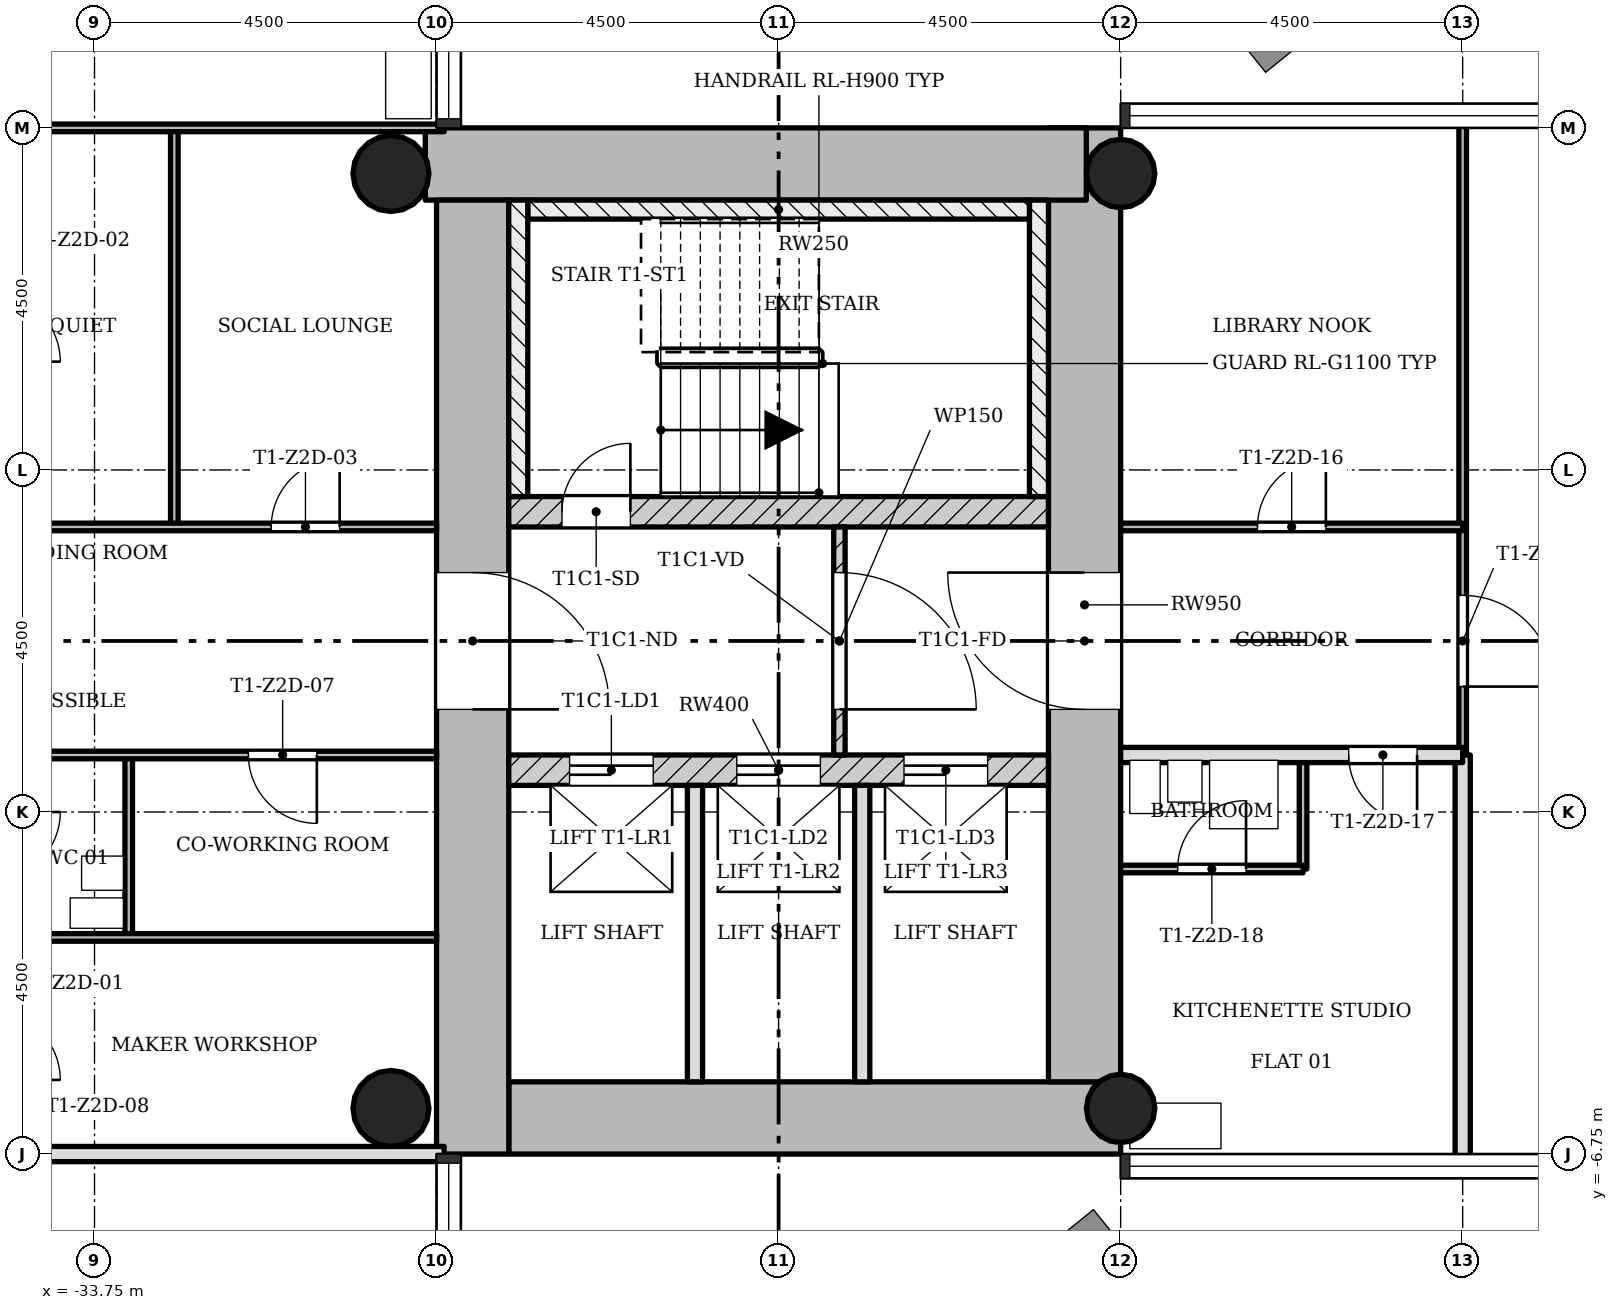
"""IFC4 building model, lengths in metres.
Left out: names, types, materials, properties, quantities, classifications, styles, units other than length and angle.
Written with IfcOpenShell. Run it as: python <this file> out.ifc"""

import sys

from ifc_helpers import new_model, si_unit, direction, frame, frame_2d, origin, origin_2d, place, context, subcontext, project, spatial, rectangle, hollow_circle, extrude, element, fill, save


model = new_model("IFC4")
c1 = context("Model", 3, precision=1e-05, world=origin(), true_north=direction((0.0, 1.0)))
c2 = subcontext(c1, "Body", "Model", "MODEL_VIEW")
j1 = project(units=[si_unit("LENGTHUNIT", "METRE"), si_unit("PLANEANGLEUNIT", "RADIAN")], contexts=[c1])
p1 = place(None, origin())
s1 = spatial("IfcSite", under=j1, at=p1, CompositionType="ELEMENT")
p2 = place(p1, origin())
s2 = spatial("IfcBuilding", under=s1, at=p2, CompositionType="ELEMENT")
p3 = place(p2, frame((0.0, 0.0, 120.8)))
s3 = spatial("IfcBuildingStorey", under=s2, at=p3, CompositionType="ELEMENT", Elevation=120.8)
p4 = place(p3, frame((-28.3, -6.275, 0.0), z_axis=(0.0, 0.0, 1.0), x_axis=(1.0, 0.0, 0.0)))
e1 = element("IfcWall", 1, at=p4, inside=s3, PredefinedType="SHEAR", context=c2, shape_type="SweptSolid", body=[
    extrude(rectangle(XDim=8.05, YDim=0.95, at=frame_2d((4.025, 0.0))), origin(), (0.0, 0.0, 1.0), 3.4),
])
p5 = place(p3, frame((-20.725, -5.8, 0.0), z_axis=(0.0, 0.0, 1.0), x_axis=(0.0, 1.0, 0.0)))
e2 = element("IfcWall", 2, at=p5, inside=s3, PredefinedType="SHEAR", context=c2, shape_type="SweptSolid", body=[
    extrude(rectangle(XDim=12.55, YDim=0.95, at=frame_2d((6.275, 0.0))), origin(), (0.0, 0.0, 1.0), 3.4),
])
p6 = place(p5, frame((4.9, 0.0, 0.0)))
e3 = element("IfcOpeningElement", 3, at=p6, cuts=e2, PredefinedType="OPENING", context=c2, shape_type="SweptSolid", body=[
    extrude(rectangle(XDim=1.8, YDim=2.1, at=frame_2d((0.9, 1.05))), frame((0.0, 0.485, 0.0), z_axis=(0.0, -1.0, 0.0), x_axis=(1.0, 0.0, 0.0)), (0.0, 0.0, 1.0), 0.97),
])
p7 = place(p3, frame((-20.702, 6.275, 0.0), z_axis=(0.0, 0.0, 1.0), x_axis=(-1.0, 0.0, 0.0)))
e4 = element("IfcWall", 4, at=p7, inside=s3, PredefinedType="SHEAR", context=c2, shape_type="SweptSolid", body=[
    extrude(rectangle(XDim=8.696, YDim=0.95, at=frame_2d((4.348, 0.0))), origin(), (0.0, 0.0, 1.0), 3.4),
])
p8 = place(p3, frame((-28.775, 5.8, 0.0), z_axis=(0.0, 0.0, 1.0), x_axis=(0.0, -1.0, 0.0)))
e5 = element("IfcWall", 5, at=p8, inside=s3, PredefinedType="SHEAR", context=c2, shape_type="SweptSolid", body=[
    extrude(rectangle(XDim=12.55, YDim=0.95, at=frame_2d((6.275, 0.0))), origin(), (0.0, 0.0, 1.0), 3.4),
])
p9 = place(p8, frame((4.9, 0.0, 0.0)))
e6 = element("IfcOpeningElement", 6, at=p9, cuts=e5, PredefinedType="OPENING", context=c2, shape_type="SweptSolid", body=[
    extrude(rectangle(XDim=1.8, YDim=2.1, at=frame_2d((0.9, 1.05))), frame((0.0, 0.485, 0.0), z_axis=(0.0, -1.0, 0.0), x_axis=(1.0, 0.0, 0.0)), (0.0, 0.0, 1.0), 0.97),
])
p10 = place(p3, frame((-28.3, -1.7, 0.0), z_axis=(0.0, 0.0, 1.0), x_axis=(1.0, 0.0, 0.0)))
e7 = element("IfcWall", 7, at=p10, inside=s3, PredefinedType="SHEAR", context=c2, shape_type="SweptSolid", body=[
    extrude(rectangle(XDim=7.1, YDim=0.4, at=frame_2d((3.55, 0.0))), origin(), (0.0, 0.0, 1.0), 3.4),
])
p11 = place(p10, frame((0.8, 0.0, 0.0)))
e8 = element("IfcOpeningElement", 8, at=p11, cuts=e7, PredefinedType="OPENING", context=c2, shape_type="SweptSolid", body=[
    extrude(rectangle(XDim=1.1, YDim=2.1, at=frame_2d((0.55, 1.05))), frame((0.0, 0.21, 0.0), z_axis=(0.0, -1.0, 0.0), x_axis=(1.0, 0.0, 0.0)), (0.0, 0.0, 1.0), 0.42),
])
p12 = place(p10, frame((3.0, 0.0, 0.0)))
e9 = element("IfcOpeningElement", 9, at=p12, cuts=e7, PredefinedType="OPENING", context=c2, shape_type="SweptSolid", body=[
    extrude(rectangle(XDim=1.1, YDim=2.1, at=frame_2d((0.55, 1.05))), frame((0.0, 0.21, 0.0), z_axis=(0.0, -1.0, 0.0), x_axis=(1.0, 0.0, 0.0)), (0.0, 0.0, 1.0), 0.42),
])
p13 = place(p10, frame((5.2, 0.0, 0.0)))
e10 = element("IfcOpeningElement", 10, at=p13, cuts=e7, PredefinedType="OPENING", context=c2, shape_type="SweptSolid", body=[
    extrude(rectangle(XDim=1.1, YDim=2.1, at=frame_2d((0.55, 1.05))), frame((0.0, 0.21, 0.0), z_axis=(0.0, -1.0, 0.0), x_axis=(1.0, 0.0, 0.0)), (0.0, 0.0, 1.0), 0.42),
])
p14 = place(p3, frame((-28.3, 1.7, 0.0), z_axis=(0.0, 0.0, 1.0), x_axis=(1.0, 0.0, 0.0)))
e11 = element("IfcWall", 11, at=p14, inside=s3, PredefinedType="SHEAR", context=c2, shape_type="SweptSolid", body=[
    extrude(rectangle(XDim=7.1, YDim=0.4, at=frame_2d((3.55, 0.0))), origin(), (0.0, 0.0, 1.0), 3.4),
])
p15 = place(p14, frame((0.7, 0.0, 0.0)))
e12 = element("IfcOpeningElement", 12, at=p15, cuts=e11, PredefinedType="OPENING", context=c2, shape_type="SweptSolid", body=[
    extrude(rectangle(XDim=0.9, YDim=2.1, at=frame_2d((0.45, 1.05))), frame((0.0, 0.21, 0.0), z_axis=(0.0, -1.0, 0.0), x_axis=(1.0, 0.0, 0.0)), (0.0, 0.0, 1.0), 0.42),
])
for number, where, z_axis, x_axis in (
    (13, (-20.25, -6.15, 0.0), (0.0, 0.0, 1.0), (1.0, 0.0, 0.0)),
    (14, (-20.25, 6.15, 0.0), (0.0, 0.0, 1.0), (1.0, 0.0, 0.0)),
):
    element("IfcColumn", number, at=place(p3, frame(where, z_axis=z_axis, x_axis=x_axis)), inside=s3, PredefinedType="COLUMN", context=c2, shape_type="SweptSolid", body=[
        extrude(hollow_circle(Radius=0.45, WallThickness=0.032, at=origin_2d()), origin(), (0.0, 0.0, 1.0), 3.4),
    ])
for number, where, z_axis, x_axis in (
    (15, (-29.85, -6.15, 0.0), (0.0, 0.0, 1.0), (1.0, 0.0, 0.0)),
    (16, (-29.85, 6.15, 0.0), (0.0, 0.0, 1.0), (1.0, 0.0, 0.0)),
):
    element("IfcColumn", number, at=place(p3, frame(where, z_axis=z_axis, x_axis=x_axis)), inside=s3, PredefinedType="COLUMN", context=c2, shape_type="SweptSolid", body=[
        extrude(hollow_circle(Radius=0.5, WallThickness=0.036, at=origin_2d()), origin(), (0.0, 0.0, 1.0), 3.4),
    ])
p16 = place(p3, frame((-23.95, -1.5, 0.0), z_axis=(0.0, 0.0, 1.0), x_axis=(0.0, 1.0, 0.0)))
e17 = element("IfcWall", 17, at=p16, inside=s3, PredefinedType="PARTITIONING", context=c2, shape_type="SweptSolid", body=[
    extrude(rectangle(XDim=3.0, YDim=0.15, at=frame_2d((1.5, 0.0))), origin(), (0.0, 0.0, 1.0), 3.0),
])
p17 = place(p16, frame((0.6, 0.0, 0.0)))
e18 = element("IfcOpeningElement", 18, at=p17, cuts=e17, PredefinedType="OPENING", context=c2, shape_type="SweptSolid", body=[
    extrude(rectangle(XDim=1.8, YDim=2.1, at=frame_2d((0.9, 1.05))), frame((0.0, 0.085, 0.0), z_axis=(0.0, -1.0, 0.0), x_axis=(1.0, 0.0, 0.0)), (0.0, 0.0, 1.0), 0.17),
])
for number, where, z_axis, x_axis in (
    (19, (-25.85, -5.8, 0.0), (0.0, 0.0, 1.0), (0.0, 1.0, 0.0)),
    (20, (-23.65, -5.8, 0.0), (0.0, 0.0, 1.0), (0.0, 1.0, 0.0)),
):
    element("IfcWall", number, at=place(p3, frame(where, z_axis=z_axis, x_axis=x_axis)), inside=s3, PredefinedType="SOLIDWALL", context=c2, shape_type="SweptSolid", body=[
        extrude(rectangle(XDim=3.9, YDim=0.2, at=frame_2d((1.95, 0.0))), origin(), (0.0, 0.0, 1.0), 3.0),
    ])
p18 = place(p3, frame((-33.3, -3.9, 0.0), z_axis=(0.0, 0.0, 1.0), x_axis=(0.0, 1.0, 0.0)))
e21 = element("IfcWall", 21, at=p18, inside=s3, PredefinedType="PARTITIONING", context=c2, shape_type="SweptSolid", body=[
    extrude(rectangle(XDim=2.4, YDim=0.1, at=frame_2d((1.2, 0.0))), origin(), (0.0, 0.0, 1.0), 3.0),
])
p19 = place(p3, frame((-32.7, 1.5, 0.0), z_axis=(0.0, 0.0, 1.0), x_axis=(0.0, 1.0, 0.0)))
e22 = element("IfcWall", 22, at=p19, inside=s3, PredefinedType="PARTITIONING", context=c2, shape_type="SweptSolid", body=[
    extrude(rectangle(XDim=5.25, YDim=0.1, at=frame_2d((2.625, 0.0))), origin(), (0.0, 0.0, 1.0), 3.0),
])
p20 = place(p3, frame((-17.85, -3.0, 0.0), z_axis=(0.0, 0.0, 1.0), x_axis=(0.0, 1.0, 0.0)))
e23 = element("IfcWall", 23, at=p20, inside=s3, PredefinedType="PARTITIONING", context=c2, shape_type="SweptSolid", body=[
    extrude(rectangle(XDim=1.5, YDim=0.1, at=frame_2d((0.75, 0.0))), origin(), (0.0, 0.0, 1.0), 3.0),
])
p21 = place(p3, frame((-15.75, -1.5, 0.0), z_axis=(0.0, 0.0, 1.0), x_axis=(0.0, 1.0, 0.0)))
e24 = element("IfcWall", 24, at=p21, inside=s3, PredefinedType="PARTITIONING", context=c2, shape_type="SweptSolid", body=[
    extrude(rectangle(XDim=8.35, YDim=0.1, at=frame_2d((4.175, 0.0))), origin(), (0.0, 0.0, 1.0), 3.0),
])
p22 = place(p21, frame((0.9, 0.0, 0.0)))
e25 = element("IfcOpeningElement", 25, at=p22, cuts=e24, PredefinedType="OPENING", context=c2, shape_type="SweptSolid", body=[
    extrude(rectangle(XDim=1.2, YDim=2.1, at=frame_2d((0.6, 1.05))), frame((0.0, 0.06, 0.0), z_axis=(0.0, -1.0, 0.0), x_axis=(1.0, 0.0, 0.0)), (0.0, 0.0, 1.0), 0.12),
])
p23 = place(p3, frame((-15.75, -6.85, 0.0), z_axis=(0.0, 0.0, 1.0), x_axis=(0.0, 1.0, 0.0)))
e26 = element("IfcWall", 26, at=p23, inside=s3, PredefinedType="SOLIDWALL", context=c2, shape_type="SweptSolid", body=[
    extrude(rectangle(XDim=5.35, YDim=0.2, at=frame_2d((2.675, 0.0))), origin(), (0.0, 0.0, 1.0), 3.0),
])
p24 = place(p3, frame((-35.1, -6.75, 0.0), z_axis=(0.0, 0.0, 1.0), x_axis=(1.0, 0.0, 0.0)))
e27 = element("IfcWall", 27, at=p24, inside=s3, PredefinedType="SOLIDWALL", context=c2, shape_type="SweptSolid", body=[
    extrude(rectangle(XDim=5.95, YDim=0.2, at=frame_2d((2.975, 0.0))), origin(), (0.0, 0.0, 1.0), 3.0),
])
p25 = place(p3, frame((-35.1, -3.9, 0.0), z_axis=(0.0, 0.0, 1.0), x_axis=(1.0, 0.0, 0.0)))
e28 = element("IfcWall", 28, at=p25, inside=s3, PredefinedType="PARTITIONING", context=c2, shape_type="SweptSolid", body=[
    extrude(rectangle(XDim=5.85, YDim=0.1, at=frame_2d((2.925, 0.0))), origin(), (0.0, 0.0, 1.0), 3.0),
])
p26 = place(p3, frame((-20.25, -3.0, 0.0), z_axis=(0.0, 0.0, 1.0), x_axis=(1.0, 0.0, 0.0)))
e29 = element("IfcWall", 29, at=p26, inside=s3, PredefinedType="PARTITIONING", context=c2, shape_type="SweptSolid", body=[
    extrude(rectangle(XDim=2.4, YDim=0.1, at=frame_2d((1.2, 0.0))), origin(), (0.0, 0.0, 1.0), 3.0),
])
p27 = place(p26, frame((0.75, 0.0, 0.0)))
e30 = element("IfcOpeningElement", 30, at=p27, cuts=e29, PredefinedType="OPENING", context=c2, shape_type="SweptSolid", body=[
    extrude(rectangle(XDim=0.9, YDim=2.1, at=frame_2d((0.45, 1.05))), frame((0.0, 0.06, 0.0), z_axis=(0.0, -1.0, 0.0), x_axis=(1.0, 0.0, 0.0)), (0.0, 0.0, 1.0), 0.12),
])
p28 = place(p3, frame((-35.1, -1.5, 0.0), z_axis=(0.0, 0.0, 1.0), x_axis=(1.0, 0.0, 0.0)))
e31 = element("IfcWall", 31, at=p28, inside=s3, PredefinedType="PARTITIONING", context=c2, shape_type="SweptSolid", body=[
    extrude(rectangle(XDim=5.85, YDim=0.1, at=frame_2d((2.925, 0.0))), origin(), (0.0, 0.0, 1.0), 3.0),
])
p29 = place(p28, frame((3.375, 0.0, 0.0)))
e32 = element("IfcOpeningElement", 32, at=p29, cuts=e31, PredefinedType="OPENING", context=c2, shape_type="SweptSolid", body=[
    extrude(rectangle(XDim=0.9, YDim=2.1, at=frame_2d((0.45, 1.05))), frame((0.0, 0.06, 0.0), z_axis=(0.0, -1.0, 0.0), x_axis=(1.0, 0.0, 0.0)), (0.0, 0.0, 1.0), 0.12),
])
p30 = place(p3, frame((-20.25, -1.5, 0.0), z_axis=(0.0, 0.0, 1.0), x_axis=(1.0, 0.0, 0.0)))
e33 = element("IfcWall", 33, at=p30, inside=s3, PredefinedType="SOLIDWALL", context=c2, shape_type="SweptSolid", body=[
    extrude(rectangle(XDim=4.5, YDim=0.2, at=frame_2d((2.25, 0.0))), origin(), (0.0, 0.0, 1.0), 3.0),
])
p31 = place(p30, frame((3.0, 0.0, 0.0)))
e34 = element("IfcOpeningElement", 34, at=p31, cuts=e33, PredefinedType="OPENING", context=c2, shape_type="SweptSolid", body=[
    extrude(rectangle(XDim=0.9, YDim=2.1, at=frame_2d((0.45, 1.05))), frame((0.0, 0.11, 0.0), z_axis=(0.0, -1.0, 0.0), x_axis=(1.0, 0.0, 0.0)), (0.0, 0.0, 1.0), 0.22),
])
p32 = place(p3, frame((-35.1, 1.5, 0.0), z_axis=(0.0, 0.0, 1.0), x_axis=(1.0, 0.0, 0.0)))
e35 = element("IfcWall", 35, at=p32, inside=s3, PredefinedType="PARTITIONING", context=c2, shape_type="SweptSolid", body=[
    extrude(rectangle(XDim=5.85, YDim=0.1, at=frame_2d((2.925, 0.0))), origin(), (0.0, 0.0, 1.0), 3.0),
])
p33 = place(p32, frame((3.675, 0.0, 0.0)))
e36 = element("IfcOpeningElement", 36, at=p33, cuts=e35, PredefinedType="OPENING", context=c2, shape_type="SweptSolid", body=[
    extrude(rectangle(XDim=0.9, YDim=2.1, at=frame_2d((0.45, 1.05))), frame((0.0, 0.06, 0.0), z_axis=(0.0, -1.0, 0.0), x_axis=(1.0, 0.0, 0.0)), (0.0, 0.0, 1.0), 0.12),
])
p34 = place(p3, frame((-20.25, 1.5, 0.0), z_axis=(0.0, 0.0, 1.0), x_axis=(1.0, 0.0, 0.0)))
e37 = element("IfcWall", 37, at=p34, inside=s3, PredefinedType="PARTITIONING", context=c2, shape_type="SweptSolid", body=[
    extrude(rectangle(XDim=4.5, YDim=0.1, at=frame_2d((2.25, 0.0))), origin(), (0.0, 0.0, 1.0), 3.0),
])
p35 = place(p34, frame((1.8, 0.0, 0.0)))
e38 = element("IfcOpeningElement", 38, at=p35, cuts=e37, PredefinedType="OPENING", context=c2, shape_type="SweptSolid", body=[
    extrude(rectangle(XDim=0.9, YDim=2.1, at=frame_2d((0.45, 1.05))), frame((0.0, 0.06, 0.0), z_axis=(0.0, -1.0, 0.0), x_axis=(1.0, 0.0, 0.0)), (0.0, 0.0, 1.0), 0.12),
])
p36 = place(p3, frame((-35.1, 6.75, 0.0), z_axis=(0.0, 0.0, 1.0), x_axis=(1.0, 0.0, 0.0)))
e39 = element("IfcWall", 39, at=p36, inside=s3, PredefinedType="PARTITIONING", context=c2, shape_type="SweptSolid", body=[
    extrude(rectangle(XDim=5.95, YDim=0.1, at=frame_2d((2.975, 0.0))), origin(), (0.0, 0.0, 1.0), 3.0),
])
p37 = place(p3, frame((-21.325, 1.9, 0.0), z_axis=(0.0, 0.0, 1.0), x_axis=(0.0, 1.0, 0.0)))
e40 = element("IfcWall", 40, at=p37, inside=s3, PredefinedType="SHEAR", context=c2, shape_type="SweptSolid", body=[
    extrude(rectangle(XDim=3.9, YDim=0.25, at=frame_2d((1.95, 0.0))), origin(), (0.0, 0.0, 1.0), 3.4),
])
p38 = place(p3, frame((-28.05, 5.675, 0.0), z_axis=(0.0, 0.0, 1.0), x_axis=(1.0, 0.0, 0.0)))
e41 = element("IfcWall", 41, at=p38, inside=s3, PredefinedType="SHEAR", context=c2, shape_type="SweptSolid", body=[
    extrude(rectangle(XDim=6.6, YDim=0.25, at=frame_2d((3.3, 0.0))), origin(), (0.0, 0.0, 1.0), 3.4),
])
p39 = place(p3, frame((-28.175, 1.9, 0.0), z_axis=(0.0, 0.0, 1.0), x_axis=(0.0, 1.0, 0.0)))
e42 = element("IfcWall", 42, at=p39, inside=s3, PredefinedType="SHEAR", context=c2, shape_type="SweptSolid", body=[
    extrude(rectangle(XDim=3.9, YDim=0.25, at=frame_2d((1.95, 0.0))), origin(), (0.0, 0.0, 1.0), 3.4),
])
p40 = place(p17, origin())
e43 = element("IfcDoor", 43, at=p40, inside=s3, OperationType="SINGLE_SWING_LEFT", PredefinedType="DOOR", context=c2, shape_type="SweptSolid", body=[
    extrude(rectangle(XDim=1.8, YDim=2.1, at=frame_2d((0.9, 1.05))), frame((0.0, 0.025, 0.0), z_axis=(0.0, -1.0, 0.0), x_axis=(1.0, 0.0, 0.0)), (0.0, 0.0, 1.0), 0.05),
])
fill(e18, e43)
p41 = place(p33, origin())
e44 = element("IfcDoor", 44, at=p41, inside=s3, OperationType="SINGLE_SWING_LEFT", PredefinedType="DOOR", context=c2, shape_type="SweptSolid", body=[
    extrude(rectangle(XDim=0.9, YDim=2.1, at=frame_2d((0.45, 1.05))), frame((0.0, 0.025, 0.0), z_axis=(0.0, -1.0, 0.0), x_axis=(1.0, 0.0, 0.0)), (0.0, 0.0, 1.0), 0.05),
])
fill(e36, e44)
p42 = place(p29, origin())
e45 = element("IfcDoor", 45, at=p42, inside=s3, OperationType="SINGLE_SWING_RIGHT", PredefinedType="DOOR", context=c2, shape_type="SweptSolid", body=[
    extrude(rectangle(XDim=0.9, YDim=2.1, at=frame_2d((0.45, 1.05))), frame((0.0, 0.025, 0.0), z_axis=(0.0, -1.0, 0.0), x_axis=(1.0, 0.0, 0.0)), (0.0, 0.0, 1.0), 0.05),
])
fill(e32, e45)
p43 = place(p35, origin())
e46 = element("IfcDoor", 46, at=p43, inside=s3, OperationType="SINGLE_SWING_LEFT", PredefinedType="DOOR", context=c2, shape_type="SweptSolid", body=[
    extrude(rectangle(XDim=0.9, YDim=2.1, at=frame_2d((0.45, 1.05))), frame((0.0, 0.025, 0.0), z_axis=(0.0, -1.0, 0.0), x_axis=(1.0, 0.0, 0.0)), (0.0, 0.0, 1.0), 0.05),
])
fill(e38, e46)
p44 = place(p31, origin())
e47 = element("IfcDoor", 47, at=p44, inside=s3, OperationType="SINGLE_SWING_RIGHT", PredefinedType="DOOR", context=c2, shape_type="SweptSolid", body=[
    extrude(rectangle(XDim=0.9, YDim=2.1, at=frame_2d((0.45, 1.05))), frame((0.0, 0.025, 0.0), z_axis=(0.0, -1.0, 0.0), x_axis=(1.0, 0.0, 0.0)), (0.0, 0.0, 1.0), 0.05),
])
fill(e34, e47)
p45 = place(p27, origin())
e48 = element("IfcDoor", 48, at=p45, inside=s3, OperationType="SINGLE_SWING_LEFT", PredefinedType="DOOR", context=c2, shape_type="SweptSolid", body=[
    extrude(rectangle(XDim=0.9, YDim=2.1, at=frame_2d((0.45, 1.05))), frame((0.0, 0.025, 0.0), z_axis=(0.0, -1.0, 0.0), x_axis=(1.0, 0.0, 0.0)), (0.0, 0.0, 1.0), 0.05),
])
fill(e30, e48)
p46 = place(p22, origin())
e49 = element("IfcDoor", 49, at=p46, inside=s3, OperationType="SINGLE_SWING_LEFT", PredefinedType="DOOR", context=c2, shape_type="SweptSolid", body=[
    extrude(rectangle(XDim=1.2, YDim=2.1, at=frame_2d((0.6, 1.05))), frame((0.0, 0.025, 0.0), z_axis=(0.0, -1.0, 0.0), x_axis=(1.0, 0.0, 0.0)), (0.0, 0.0, 1.0), 0.05),
])
fill(e25, e49)
p47 = place(p15, origin())
e50 = element("IfcDoor", 50, at=p47, inside=s3, OperationType="SINGLE_SWING_LEFT", PredefinedType="DOOR", context=c2, shape_type="SweptSolid", body=[
    extrude(rectangle(XDim=0.9, YDim=2.1, at=frame_2d((0.45, 1.05))), frame((0.0, 0.025, 0.0), z_axis=(0.0, -1.0, 0.0), x_axis=(1.0, 0.0, 0.0)), (0.0, 0.0, 1.0), 0.05),
])
fill(e12, e50)
p48 = place(p11, origin())
e51 = element("IfcDoor", 51, at=p48, inside=s3, OperationType="SLIDING_TO_LEFT", PredefinedType="DOOR", context=c2, shape_type="SweptSolid", body=[
    extrude(rectangle(XDim=1.1, YDim=2.1, at=frame_2d((0.55, 1.05))), frame((0.0, 0.025, 0.0), z_axis=(0.0, -1.0, 0.0), x_axis=(1.0, 0.0, 0.0)), (0.0, 0.0, 1.0), 0.05),
])
fill(e8, e51)
p49 = place(p12, origin())
e52 = element("IfcDoor", 52, at=p49, inside=s3, OperationType="SLIDING_TO_LEFT", PredefinedType="DOOR", context=c2, shape_type="SweptSolid", body=[
    extrude(rectangle(XDim=1.1, YDim=2.1, at=frame_2d((0.55, 1.05))), frame((0.0, 0.025, 0.0), z_axis=(0.0, -1.0, 0.0), x_axis=(1.0, 0.0, 0.0)), (0.0, 0.0, 1.0), 0.05),
])
fill(e9, e52)
p50 = place(p13, origin())
e53 = element("IfcDoor", 53, at=p50, inside=s3, OperationType="SLIDING_TO_LEFT", PredefinedType="DOOR", context=c2, shape_type="SweptSolid", body=[
    extrude(rectangle(XDim=1.1, YDim=2.1, at=frame_2d((0.55, 1.05))), frame((0.0, 0.025, 0.0), z_axis=(0.0, -1.0, 0.0), x_axis=(1.0, 0.0, 0.0)), (0.0, 0.0, 1.0), 0.05),
])
fill(e10, e53)
p51 = place(p9, origin())
e54 = element("IfcDoor", 54, at=p51, inside=s3, OperationType="SINGLE_SWING_LEFT", PredefinedType="DOOR", context=c2, shape_type="SweptSolid", body=[
    extrude(rectangle(XDim=1.8, YDim=2.1, at=frame_2d((0.9, 1.05))), frame((0.0, 0.025, 0.0), z_axis=(0.0, -1.0, 0.0), x_axis=(1.0, 0.0, 0.0)), (0.0, 0.0, 1.0), 0.05),
])
fill(e6, e54)
p52 = place(p6, origin())
e55 = element("IfcDoor", 55, at=p52, inside=s3, OperationType="SINGLE_SWING_LEFT", PredefinedType="DOOR", context=c2, shape_type="SweptSolid", body=[
    extrude(rectangle(XDim=1.8, YDim=2.1, at=frame_2d((0.9, 1.05))), frame((0.0, 0.025, 0.0), z_axis=(0.0, -1.0, 0.0), x_axis=(1.0, 0.0, 0.0)), (0.0, 0.0, 1.0), 0.05),
])
fill(e3, e55)
save(model, sys.argv[1])
